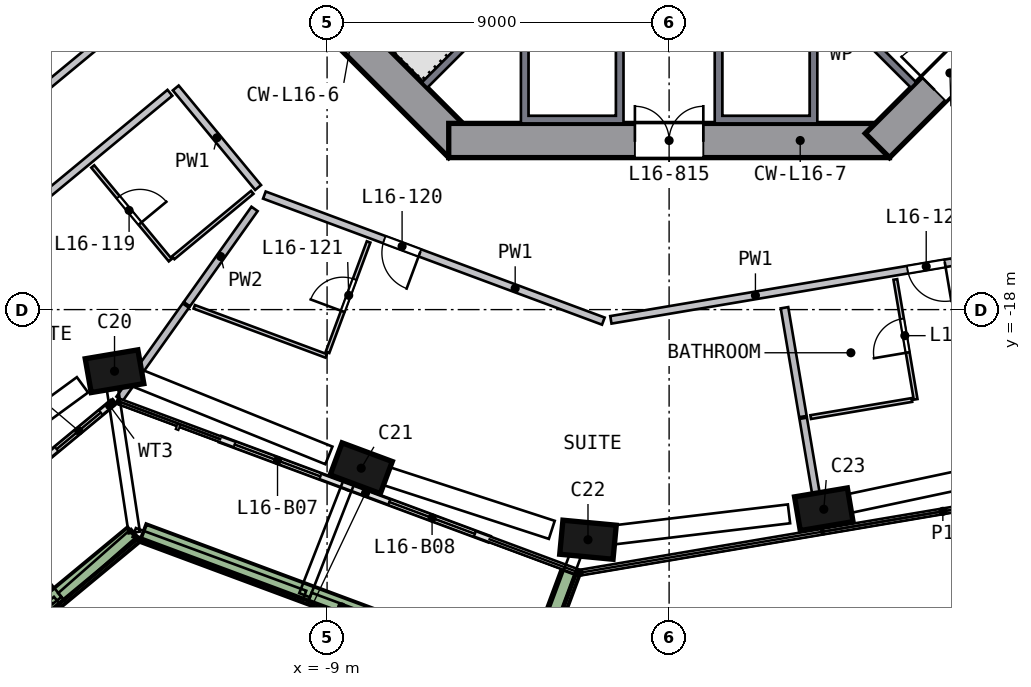
"""IFC4 building model, lengths in metres.
Left out: names, types, materials, properties, quantities, classifications, styles, units other than length and angle.
Written with IfcOpenShell. Run it as: python <this file> out.ifc"""

import sys

from ifc_helpers import new_model, si_unit, direction, frame, frame_2d, origin, origin_2d, place, context, subcontext, project, spatial, polyline, rectangle, outline, extrude, element, fill, save


model = new_model("IFC4")
c1 = context("Model", 3, precision=1e-05, world=origin(), true_north=direction((0.0, 1.0)))
c2 = subcontext(c1, "Body", "Model", "MODEL_VIEW")
j1 = project(units=[si_unit("LENGTHUNIT", "METRE"), si_unit("PLANEANGLEUNIT", "RADIAN")], contexts=[c1])
p1 = place(None, origin())
s1 = spatial("IfcSite", under=j1, at=p1, CompositionType="ELEMENT")
p2 = place(p1, origin())
s2 = spatial("IfcBuilding", under=s1, at=p2, CompositionType="ELEMENT")
p3 = place(p2, frame((0.0, 0.0, 71.5)))
s3 = spatial("IfcBuildingStorey", under=s2, at=p3, CompositionType="ELEMENT", Elevation=71.5)
p4 = place(p3, frame((-14.706, -19.538, 0.0), z_axis=(0.09351816, -0.069108061, 0.993216205), x_axis=(-0.981577909, -0.173340331, 0.0803613)))
e1 = element("IfcColumn", 1, at=p4, inside=s3, PredefinedType="COLUMN", context=c2, shape_type="SweptSolid", body=[
    extrude(rectangle(XDim=1.4, YDim=0.9, at=origin_2d()), origin(), (0.0, 0.0, 1.0), 3.021),
])
p5 = place(p3, frame((-8.229, -22.128, 0.0), z_axis=(0.105609969, -0.038249246, 0.993671741), x_axis=(0.931379606, -0.346289556, -0.112319069)))
e2 = element("IfcColumn", 2, at=p5, inside=s3, PredefinedType="COLUMN", context=c2, shape_type="SweptSolid", body=[
    extrude(rectangle(XDim=1.4, YDim=0.9, at=origin_2d()), origin(), (0.0, 0.0, 1.0), 3.019),
])
p6 = place(p3, frame((-2.273, -24.044, 0.0), z_axis=(0.114391555, -0.009781893, 0.993387581), x_axis=(-0.989021644, 0.093037691, 0.114804947)))
e3 = element("IfcColumn", 3, at=p6, inside=s3, PredefinedType="COLUMN", context=c2, shape_type="SweptSolid", body=[
    extrude(rectangle(XDim=1.4, YDim=0.9, at=origin_2d()), origin(), (0.0, 0.0, 1.0), 3.02),
])
p7 = place(p3, frame((3.937, -23.278, 0.0), z_axis=(0.110623387, 0.019569342, 0.993669717), x_axis=(0.979911476, 0.164784415, -0.112336973)))
e4 = element("IfcColumn", 4, at=p7, inside=s3, PredefinedType="COLUMN", context=c2, shape_type="SweptSolid", body=[
    extrude(rectangle(XDim=1.4, YDim=0.9, at=origin_2d()), origin(), (0.0, 0.0, 1.0), 3.019),
])
p8 = place(p3, frame((-13.682, -5.481, 0.0), z_axis=(0.0, 0.0, 1.0), x_axis=(0.707106781, -0.707106781, 0.0)))
e5 = element("IfcWall", 5, at=p8, inside=s3, PredefinedType="SHEAR", context=c2, shape_type="SweptSolid", body=[
    extrude(rectangle(XDim=11.598, YDim=0.9, at=frame_2d((5.799, 0.0))), origin(), (0.0, 0.0, 1.0), 3.5),
])
p9 = place(p8, frame((2.099, 0.0, 0.0)))
e6 = element("IfcOpeningElement", 6, at=p9, cuts=e5, PredefinedType="OPENING", context=c2, shape_type="SweptSolid", body=[
    extrude(rectangle(XDim=1.2, YDim=2.1, at=frame_2d((0.6, 1.05))), frame((0.0, 0.46, 0.0), z_axis=(0.0, -1.0, 0.0), x_axis=(1.0, 0.0, 0.0)), (0.0, 0.0, 1.0), 0.92),
])
p10 = place(p3, frame((-5.799, -13.55, 0.0), z_axis=(0.0, 0.0, 1.0), x_axis=(1.0, 0.0, 0.0)))
e7 = element("IfcWall", 7, at=p10, inside=s3, PredefinedType="SHEAR", context=c2, shape_type="SweptSolid", body=[
    extrude(rectangle(XDim=11.598, YDim=0.9, at=frame_2d((5.799, 0.0))), origin(), (0.0, 0.0, 1.0), 3.5),
])
p11 = place(p10, frame((4.899, 0.0, 0.0)))
e8 = element("IfcOpeningElement", 8, at=p11, cuts=e7, PredefinedType="OPENING", context=c2, shape_type="SweptSolid", body=[
    extrude(rectangle(XDim=1.8, YDim=2.1, at=frame_2d((0.9, 1.05))), frame((0.0, 0.46, 0.0), z_axis=(0.0, -1.0, 0.0), x_axis=(1.0, 0.0, 0.0)), (0.0, 0.0, 1.0), 0.92),
])
p12 = place(p3, frame((5.481, -13.682, 0.0), z_axis=(0.0, 0.0, 1.0), x_axis=(0.707106781, 0.707106781, 0.0)))
e9 = element("IfcWall", 9, at=p12, inside=s3, PredefinedType="SHEAR", context=c2, shape_type="SweptSolid", body=[
    extrude(rectangle(XDim=11.598, YDim=0.9, at=frame_2d((5.799, 0.0))), origin(), (0.0, 0.0, 1.0), 3.5),
])
p13 = place(p12, frame((2.099, 0.0, 0.0)))
e10 = element("IfcOpeningElement", 10, at=p13, cuts=e9, PredefinedType="OPENING", context=c2, shape_type="SweptSolid", body=[
    extrude(rectangle(XDim=1.2, YDim=2.1, at=frame_2d((0.6, 1.05))), frame((0.0, 0.46, 0.0), z_axis=(0.0, -1.0, 0.0), x_axis=(1.0, 0.0, 0.0)), (0.0, 0.0, 1.0), 0.92),
])
p14 = place(p3, frame((-16.422, -21.924, 0.0), z_axis=(0.0, 0.0, 1.0), x_axis=(0.770521952, 0.637413462, 0.0)))
e11 = element("IfcWall", 11, at=p14, inside=s3, PredefinedType="SOLIDWALL", context=c2, shape_type="SweptSolid", body=[
    extrude(rectangle(XDim=2.3, YDim=0.15, at=frame_2d((1.15, 0.0))), origin(), (0.0, 0.0, 1.0), 2.935),
])
p15 = place(p14, frame((0.4, 0.0, 0.0)))
e12 = element("IfcOpeningElement", 12, at=p15, cuts=e11, PredefinedType="OPENING", context=c2, shape_type="SweptSolid", body=[
    extrude(rectangle(XDim=1.5, YDim=2.4, at=frame_2d((0.75, 1.2))), frame((0.0, 0.085, 0.0), z_axis=(0.0, -1.0, 0.0), x_axis=(1.0, 0.0, 0.0)), (0.0, 0.0, 1.0), 0.17),
])
p16 = place(p3, frame((-11.804, -21.412, 0.0), z_axis=(0.0, 0.0, 1.0), x_axis=(0.937281631, -0.348573011, 0.0)))
e13 = element("IfcWall", 13, at=p16, inside=s3, PredefinedType="SOLIDWALL", context=c2, shape_type="SweptSolid", body=[
    extrude(rectangle(XDim=3.6, YDim=0.15, at=frame_2d((1.8, 0.0))), origin(), (0.0, 0.0, 1.0), 2.935),
])
p17 = place(p16, frame((0.4, 0.0, 0.0)))
e14 = element("IfcOpeningElement", 14, at=p17, cuts=e13, PredefinedType="OPENING", context=c2, shape_type="SweptSolid", body=[
    extrude(rectangle(XDim=2.4, YDim=2.4, at=frame_2d((1.2, 1.2))), frame((0.0, 0.085, 0.0), z_axis=(0.0, -1.0, 0.0), x_axis=(1.0, 0.0, 0.0)), (0.0, 0.0, 1.0), 0.17),
])
p18 = place(p3, frame((-8.43, -22.667, 0.0), z_axis=(0.0, 0.0, 1.0), x_axis=(0.937285903, -0.348561523, 0.0)))
e15 = element("IfcWall", 15, at=p18, inside=s3, PredefinedType="SOLIDWALL", context=c2, shape_type="SweptSolid", body=[
    extrude(rectangle(XDim=3.939, YDim=0.15, at=frame_2d((1.97, 0.0))), origin(), (0.0, 0.0, 1.0), 2.935),
])
p19 = place(p18, frame((1.139, 0.0, 0.0)))
e16 = element("IfcOpeningElement", 16, at=p19, cuts=e15, PredefinedType="OPENING", context=c2, shape_type="SweptSolid", body=[
    extrude(rectangle(XDim=2.4, YDim=2.4, at=frame_2d((1.2, 1.2))), frame((0.0, 0.085, 0.0), z_axis=(0.0, -1.0, 0.0), x_axis=(1.0, 0.0, 0.0)), (0.0, 0.0, 1.0), 0.17),
])
p20 = place(p3, frame((-19.078, -28.047, 0.0), z_axis=(0.0, 0.0, 1.0), x_axis=(0.770510589, 0.637427197, 0.0)))
e17 = element("IfcWall", 17, at=p20, inside=s3, PredefinedType="SOLIDWALL", context=c2, shape_type="SweptSolid", body=[
    extrude(rectangle(XDim=6.472, YDim=0.5, at=frame_2d((3.236, 0.0))), origin(), (0.0, 0.0, 1.0), 0.7),
])
p21 = place(p3, frame((-13.845, -23.88, 0.0), z_axis=(0.0, 0.0, 1.0), x_axis=(0.937280243, -0.348576744, 0.0)))
e18 = element("IfcWall", 18, at=p21, inside=s3, PredefinedType="SOLIDWALL", context=c2, shape_type="SweptSolid", body=[
    extrude(rectangle(XDim=11.152, YDim=0.5, at=frame_2d((5.576, 0.0))), origin(), (0.0, 0.0, 1.0), 0.7),
])
p22 = place(p3, frame((-3.539, -27.446, 0.0), z_axis=(0.0, 0.0, 1.0), x_axis=(0.348554455, 0.937288532, 0.0)))
e19 = element("IfcWall", 19, at=p22, inside=s3, PredefinedType="SOLIDWALL", context=c2, shape_type="SweptSolid", body=[
    extrude(rectangle(XDim=2.699, YDim=0.5, at=frame_2d((1.349, 0.0))), origin(), (0.0, 0.0, 1.0), 0.7),
])
p23 = place(p3, origin())
e20 = element("IfcWall", 20, at=p23, inside=s3, PredefinedType="SOLIDWALL", context=c2, shape_type="SweptSolid", body=[
    extrude(outline(polyline([(-1.2, -13.1), (-3.9, -13.1), (-3.9, -10.7), (-1.2, -10.7), (-1.2, -13.1)]), holes=[polyline([(-3.7, -10.9), (-3.7, -12.9), (-1.4, -12.9), (-1.4, -10.9), (-3.7, -10.9)])]), origin(), (0.0, 0.0, 1.0), 3.0),
])
p24 = place(p3, origin())
e21 = element("IfcWall", 21, at=p24, inside=s3, PredefinedType="SOLIDWALL", context=c2, shape_type="SweptSolid", body=[
    extrude(outline(polyline([(3.9, -10.7), (3.9, -13.1), (1.2, -13.1), (1.2, -10.7), (3.9, -10.7)]), holes=[polyline([(1.4, -12.9), (3.7, -12.9), (3.7, -10.9), (1.4, -10.9), (1.4, -12.9)])]), origin(), (0.0, 0.0, 1.0), 3.0),
])
for number, where, z_axis, x_axis in (
    (22, (-3.677, -9.334, 0.0), (0.0, 0.0, 1.0), (-0.707, -0.707, 0.0)),
    (23, (3.677, -9.334, 0.0), (0.0, 0.0, 1.0), (0.707, -0.707, 0.0)),
):
    element("IfcWall", number, at=place(p3, frame(where, z_axis=z_axis, x_axis=x_axis)), inside=s3, PredefinedType="SOLIDWALL", context=c2, shape_type="SweptSolid", body=[
        extrude(rectangle(XDim=3.9, YDim=0.2, at=frame_2d((1.95, 0.0))), origin(), (0.0, 0.0, 1.0), 3.0),
    ])
p25 = place(p3, frame((-26.188, -20.237, 0.0), z_axis=(0.0, 0.0, 1.0), x_axis=(0.770503626, 0.637435615, 0.0)))
e24 = element("IfcWall", 24, at=p25, inside=s3, PredefinedType="SOLIDWALL", context=c2, shape_type="SweptSolid", body=[
    extrude(rectangle(XDim=15.32, YDim=0.2, at=frame_2d((7.66, 0.0))), origin(), (0.0, 0.0, 1.0), 3.0),
])
p26 = place(p25, frame((9.36, 0.0, 0.0)))
e25 = element("IfcOpeningElement", 25, at=p26, cuts=e24, PredefinedType="OPENING", context=c2, shape_type="SweptSolid", body=[
    extrude(rectangle(XDim=1.0, YDim=2.1, at=frame_2d((0.5, 1.05))), frame((0.0, 0.11, 0.0), z_axis=(0.0, -1.0, 0.0), x_axis=(1.0, 0.0, 0.0)), (0.0, 0.0, 1.0), 0.22),
])
p27 = place(p3, frame((-13.136, -12.295, 0.0), z_axis=(0.0, 0.0, 1.0), x_axis=(-0.770511361, -0.637426264, 0.0)))
e26 = element("IfcWall", 26, at=p27, inside=s3, PredefinedType="SOLIDWALL", context=c2, shape_type="SweptSolid", body=[
    extrude(rectangle(XDim=15.12, YDim=0.2, at=frame_2d((7.56, 0.0))), origin(), (0.0, 0.0, 1.0), 3.0),
])
p28 = place(p27, frame((6.85, 0.0, 0.0)))
e27 = element("IfcOpeningElement", 27, at=p28, cuts=e26, PredefinedType="OPENING", context=c2, shape_type="SweptSolid", body=[
    extrude(rectangle(XDim=1.0, YDim=2.1, at=frame_2d((0.5, 1.05))), frame((0.0, 0.11, 0.0), z_axis=(0.0, -1.0, 0.0), x_axis=(1.0, 0.0, 0.0)), (0.0, 0.0, 1.0), 0.22),
])
p29 = place(p3, frame((-12.982, -12.167, 0.0), z_axis=(0.0, 0.0, 1.0), x_axis=(0.637397216, -0.770535391, 0.0)))
e28 = element("IfcWall", 28, at=p29, inside=s3, PredefinedType="SOLIDWALL", context=c2, shape_type="SweptSolid", body=[
    extrude(rectangle(XDim=3.4, YDim=0.2, at=frame_2d((1.7, 0.0))), origin(), (0.0, 0.0, 1.0), 3.0),
])
p30 = place(p3, frame((-1.731, -18.303, 0.0), z_axis=(0.0, 0.0, 1.0), x_axis=(-0.937286188, 0.348560757, 0.0)))
e29 = element("IfcWall", 29, at=p30, inside=s3, PredefinedType="SOLIDWALL", context=c2, shape_type="SweptSolid", body=[
    extrude(rectangle(XDim=9.516, YDim=0.2, at=frame_2d((4.758, 0.0))), origin(), (0.0, 0.0, 1.0), 3.0),
])
p31 = place(p30, frame((5.15, 0.0, 0.0)))
e30 = element("IfcOpeningElement", 30, at=p31, cuts=e29, PredefinedType="OPENING", context=c2, shape_type="SweptSolid", body=[
    extrude(rectangle(XDim=1.0, YDim=2.1, at=frame_2d((0.5, 1.05))), frame((0.0, 0.11, 0.0), z_axis=(0.0, -1.0, 0.0), x_axis=(1.0, 0.0, 0.0)), (0.0, 0.0, 1.0), 0.22),
])
p32 = place(p3, frame((7.456, -16.75, 0.0), z_axis=(0.0, 0.0, 1.0), x_axis=(-0.985995117, -0.166774184, 0.0)))
e31 = element("IfcWall", 31, at=p32, inside=s3, PredefinedType="SOLIDWALL", context=c2, shape_type="SweptSolid", body=[
    extrude(rectangle(XDim=9.116, YDim=0.2, at=frame_2d((4.558, 0.0))), origin(), (0.0, 0.0, 1.0), 3.0),
])
p33 = place(p32, frame((0.2, 0.0, 0.0)))
e32 = element("IfcOpeningElement", 32, at=p33, cuts=e31, PredefinedType="OPENING", context=c2, shape_type="SweptSolid", body=[
    extrude(rectangle(XDim=1.0, YDim=2.1, at=frame_2d((0.5, 1.05))), frame((0.0, 0.11, 0.0), z_axis=(0.0, -1.0, 0.0), x_axis=(1.0, 0.0, 0.0)), (0.0, 0.0, 1.0), 0.22),
])
p34 = place(p3, frame((-12.717, -17.894, 0.0), z_axis=(0.0, 0.0, 1.0), x_axis=(-0.579280855, -0.815128021, 0.0)))
e33 = element("IfcWall", 33, at=p34, inside=s3, PredefinedType="SOLIDWALL", context=c2, shape_type="SweptSolid", body=[
    extrude(rectangle(XDim=3.011, YDim=0.2, at=frame_2d((1.506, 0.0))), origin(), (0.0, 0.0, 1.0), 3.0),
])
p35 = place(p3, frame((-10.909, -15.351, 0.0), z_axis=(0.0, 0.0, 1.0), x_axis=(-0.579336263, -0.815088642, 0.0)))
e34 = element("IfcWall", 34, at=p35, inside=s3, PredefinedType="SOLIDWALL", context=c2, shape_type="SweptSolid", body=[
    extrude(rectangle(XDim=3.075, YDim=0.2, at=frame_2d((1.537, 0.0))), origin(), (0.0, 0.0, 1.0), 3.0),
])
p36 = place(p3, frame((3.036, -17.951, 0.0), z_axis=(0.0, 0.0, 1.0), x_axis=(0.166756479, -0.985998112, 0.0)))
e35 = element("IfcWall", 35, at=p36, inside=s3, PredefinedType="SOLIDWALL", context=c2, shape_type="SweptSolid", body=[
    extrude(rectangle(XDim=2.905, YDim=0.2, at=frame_2d((1.452, 0.0))), origin(), (0.0, 0.0, 1.0), 3.0),
])
p37 = place(p3, frame((3.528, -20.86, 0.0), z_axis=(0.0, 0.0, 1.0), x_axis=(0.166732133, -0.986002229, 0.0)))
e36 = element("IfcWall", 36, at=p37, inside=s3, PredefinedType="SOLIDWALL", context=c2, shape_type="SweptSolid", body=[
    extrude(rectangle(XDim=2.952, YDim=0.2, at=frame_2d((1.476, 0.0))), origin(), (0.0, 0.0, 1.0), 3.0),
])
p38 = place(p3, frame((-15.166, -14.233, 0.0), z_axis=(0.0, 0.0, 1.0), x_axis=(0.637403759, -0.770529978, 0.0)))
e37 = element("IfcWall", 37, at=p38, inside=s3, PredefinedType="PARTITIONING", context=c2, shape_type="SweptSolid", body=[
    extrude(rectangle(XDim=3.2, YDim=0.1, at=frame_2d((1.6, 0.0))), origin(), (0.0, 0.0, 1.0), 3.0),
])
p39 = place(p38, frame((1.05, 0.0, 0.0)))
e38 = element("IfcOpeningElement", 38, at=p39, cuts=e37, PredefinedType="OPENING", context=c2, shape_type="SweptSolid", body=[
    extrude(rectangle(XDim=0.9, YDim=2.1, at=frame_2d((0.45, 1.05))), frame((0.0, 0.06, 0.0), z_axis=(0.0, -1.0, 0.0), x_axis=(1.0, 0.0, 0.0)), (0.0, 0.0, 1.0), 0.12),
])
p40 = place(p3, frame((-10.969, -14.914, 0.0), z_axis=(0.0, 0.0, 1.0), x_axis=(-0.770477014, -0.63746778, 0.0)))
e39 = element("IfcWall", 39, at=p40, inside=s3, PredefinedType="PARTITIONING", context=c2, shape_type="SweptSolid", body=[
    extrude(rectangle(XDim=2.7, YDim=0.1, at=frame_2d((1.35, 0.0))), origin(), (0.0, 0.0, 1.0), 3.0),
])
p41 = place(p3, frame((-9.023, -19.219, 0.0), z_axis=(0.0, 0.0, 1.0), x_axis=(-0.937268435, 0.348608492, 0.0)))
e40 = element("IfcWall", 40, at=p41, inside=s3, PredefinedType="PARTITIONING", context=c2, shape_type="SweptSolid", body=[
    extrude(rectangle(XDim=3.704, YDim=0.1, at=frame_2d((1.852, 0.0))), origin(), (0.0, 0.0, 1.0), 3.0),
])
p42 = place(p3, frame((-8.988, -19.125, 0.0), z_axis=(0.0, 0.0, 1.0), x_axis=(0.348550316, 0.937290071, 0.0)))
e41 = element("IfcWall", 41, at=p42, inside=s3, PredefinedType="PARTITIONING", context=c2, shape_type="SweptSolid", body=[
    extrude(rectangle(XDim=3.1, YDim=0.1, at=frame_2d((1.55, 0.0))), origin(), (0.0, 0.0, 1.0), 3.0),
])
p43 = place(p42, frame((1.15, 0.0, 0.0)))
e42 = element("IfcOpeningElement", 42, at=p43, cuts=e41, PredefinedType="OPENING", context=c2, shape_type="SweptSolid", body=[
    extrude(rectangle(XDim=0.9, YDim=2.1, at=frame_2d((0.45, 1.05))), frame((0.0, 0.06, 0.0), z_axis=(0.0, -1.0, 0.0), x_axis=(1.0, 0.0, 0.0)), (0.0, 0.0, 1.0), 0.12),
])
p44 = place(p3, frame((6.388, -20.378, 0.0), z_axis=(0.0, 0.0, 1.0), x_axis=(-0.986002618, -0.166729833, 0.0)))
e43 = element("IfcWall", 43, at=p44, inside=s3, PredefinedType="PARTITIONING", context=c2, shape_type="SweptSolid", body=[
    extrude(rectangle(XDim=2.7, YDim=0.1, at=frame_2d((1.35, 0.0))), origin(), (0.0, 0.0, 1.0), 3.0),
])
p45 = place(p3, frame((6.487, -20.362, 0.0), z_axis=(0.0, 0.0, 1.0), x_axis=(-0.166773866, 0.985995171, 0.0)))
e44 = element("IfcWall", 44, at=p45, inside=s3, PredefinedType="PARTITIONING", context=c2, shape_type="SweptSolid", body=[
    extrude(rectangle(XDim=3.2, YDim=0.1, at=frame_2d((1.6, 0.0))), origin(), (0.0, 0.0, 1.0), 3.0),
])
p46 = place(p45, frame((1.25, 0.0, 0.0)))
e45 = element("IfcOpeningElement", 45, at=p46, cuts=e44, PredefinedType="OPENING", context=c2, shape_type="SweptSolid", body=[
    extrude(rectangle(XDim=0.9, YDim=2.1, at=frame_2d((0.45, 1.05))), frame((0.0, 0.06, 0.0), z_axis=(0.0, -1.0, 0.0), x_axis=(1.0, 0.0, 0.0)), (0.0, 0.0, 1.0), 0.12),
])
p47 = place(p15, origin())
e46 = element("IfcDoor", 46, at=p47, inside=s3, OperationType="SLIDING_TO_RIGHT", PredefinedType="DOOR", context=c2, shape_type="SweptSolid", body=[
    extrude(rectangle(XDim=1.5, YDim=2.4, at=frame_2d((0.75, 1.2))), frame((0.0, 0.025, 0.0), z_axis=(0.0, -1.0, 0.0), x_axis=(1.0, 0.0, 0.0)), (0.0, 0.0, 1.0), 0.05),
])
fill(e12, e46)
p48 = place(p17, origin())
e47 = element("IfcDoor", 47, at=p48, inside=s3, OperationType="SLIDING_TO_RIGHT", PredefinedType="DOOR", context=c2, shape_type="SweptSolid", body=[
    extrude(rectangle(XDim=2.4, YDim=2.4, at=frame_2d((1.2, 1.2))), frame((0.0, 0.025, 0.0), z_axis=(0.0, -1.0, 0.0), x_axis=(1.0, 0.0, 0.0)), (0.0, 0.0, 1.0), 0.05),
])
fill(e14, e47)
p49 = place(p19, origin())
e48 = element("IfcDoor", 48, at=p49, inside=s3, OperationType="SLIDING_TO_LEFT", PredefinedType="DOOR", context=c2, shape_type="SweptSolid", body=[
    extrude(rectangle(XDim=2.4, YDim=2.4, at=frame_2d((1.2, 1.2))), frame((0.0, 0.025, 0.0), z_axis=(0.0, -1.0, 0.0), x_axis=(1.0, 0.0, 0.0)), (0.0, 0.0, 1.0), 0.05),
])
fill(e16, e48)
p50 = place(p11, origin())
e49 = element("IfcDoor", 49, at=p50, inside=s3, OperationType="DOUBLE_DOOR_SINGLE_SWING", PredefinedType="DOOR", context=c2, shape_type="SweptSolid", body=[
    extrude(rectangle(XDim=1.8, YDim=2.1, at=frame_2d((0.9, 1.05))), frame((0.0, 0.025, 0.0), z_axis=(0.0, -1.0, 0.0), x_axis=(1.0, 0.0, 0.0)), (0.0, 0.0, 1.0), 0.05),
])
fill(e8, e49)
p51 = place(p13, origin())
e50 = element("IfcDoor", 50, at=p51, inside=s3, OperationType="SINGLE_SWING_LEFT", PredefinedType="DOOR", context=c2, shape_type="SweptSolid", body=[
    extrude(rectangle(XDim=1.2, YDim=2.1, at=frame_2d((0.6, 1.05))), frame((0.0, 0.025, 0.0), z_axis=(0.0, -1.0, 0.0), x_axis=(1.0, 0.0, 0.0)), (0.0, 0.0, 1.0), 0.05),
])
fill(e10, e50)
p52 = place(p39, origin())
e51 = element("IfcDoor", 51, at=p52, inside=s3, OperationType="SINGLE_SWING_RIGHT", PredefinedType="DOOR", context=c2, shape_type="SweptSolid", body=[
    extrude(rectangle(XDim=0.9, YDim=2.1, at=frame_2d((0.45, 1.05))), frame((0.0, 0.025, 0.0), z_axis=(0.0, -1.0, 0.0), x_axis=(1.0, 0.0, 0.0)), (0.0, 0.0, 1.0), 0.05),
])
fill(e38, e51)
p53 = place(p31, origin())
e52 = element("IfcDoor", 52, at=p53, inside=s3, OperationType="SINGLE_SWING_LEFT", PredefinedType="DOOR", context=c2, shape_type="SweptSolid", body=[
    extrude(rectangle(XDim=1.0, YDim=2.1, at=frame_2d((0.5, 1.05))), frame((0.0, 0.025, 0.0), z_axis=(0.0, -1.0, 0.0), x_axis=(1.0, 0.0, 0.0)), (0.0, 0.0, 1.0), 0.05),
])
fill(e30, e52)
p54 = place(p43, origin())
e53 = element("IfcDoor", 53, at=p54, inside=s3, OperationType="SINGLE_SWING_LEFT", PredefinedType="DOOR", context=c2, shape_type="SweptSolid", body=[
    extrude(rectangle(XDim=0.9, YDim=2.1, at=frame_2d((0.45, 1.05))), frame((0.0, 0.025, 0.0), z_axis=(0.0, -1.0, 0.0), x_axis=(1.0, 0.0, 0.0)), (0.0, 0.0, 1.0), 0.05),
])
fill(e42, e53)
p55 = place(p33, origin())
e54 = element("IfcDoor", 54, at=p55, inside=s3, OperationType="SINGLE_SWING_LEFT", PredefinedType="DOOR", context=c2, shape_type="SweptSolid", body=[
    extrude(rectangle(XDim=1.0, YDim=2.1, at=frame_2d((0.5, 1.05))), frame((0.0, 0.025, 0.0), z_axis=(0.0, -1.0, 0.0), x_axis=(1.0, 0.0, 0.0)), (0.0, 0.0, 1.0), 0.05),
])
fill(e32, e54)
p56 = place(p46, origin())
e55 = element("IfcDoor", 55, at=p56, inside=s3, OperationType="SINGLE_SWING_LEFT", PredefinedType="DOOR", context=c2, shape_type="SweptSolid", body=[
    extrude(rectangle(XDim=0.9, YDim=2.1, at=frame_2d((0.45, 1.05))), frame((0.0, 0.025, 0.0), z_axis=(0.0, -1.0, 0.0), x_axis=(1.0, 0.0, 0.0)), (0.0, 0.0, 1.0), 0.05),
])
fill(e45, e55)
save(model, sys.argv[1])
